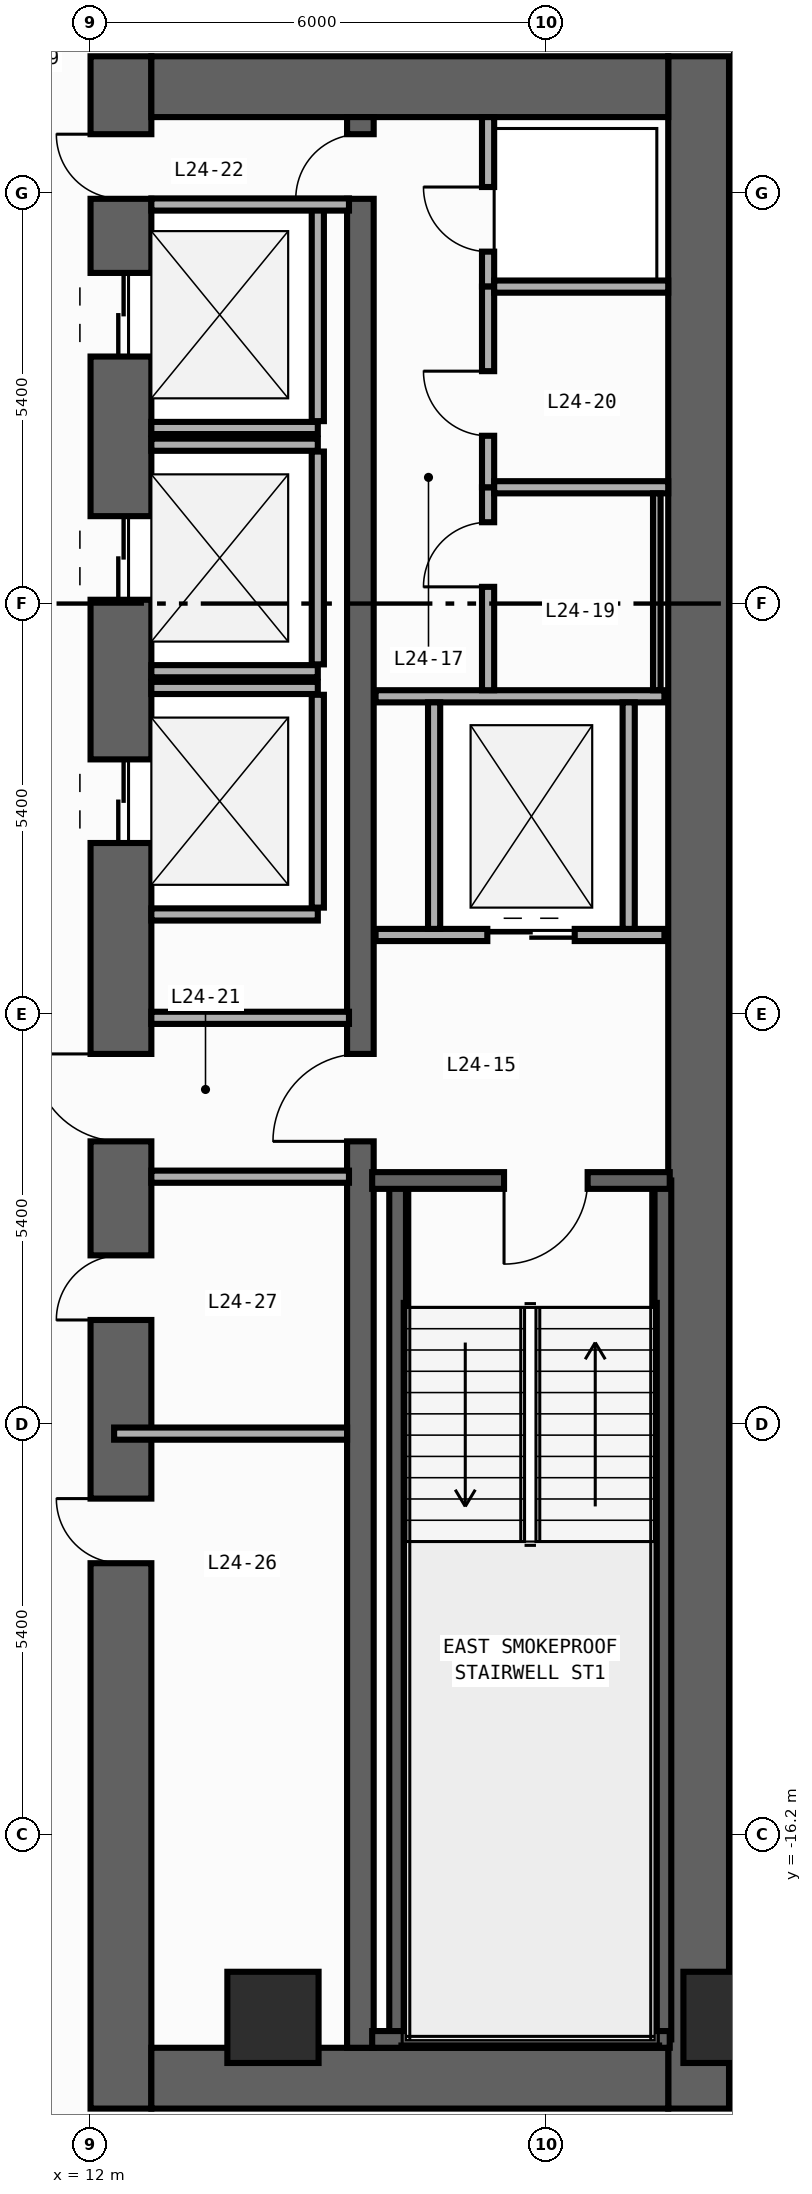
"""IFC4 building model, lengths in metres.
Left out: names, types, materials, properties, quantities, classifications, styles, units other than length and angle.
Written with IfcOpenShell. Run it as: python <this file> out.ifc"""

import sys

from ifc_helpers import new_model, si_unit, direction, frame, frame_2d, origin, origin_2d, place, context, subcontext, project, spatial, rectangle, extrude, element, fill, save


model = new_model("IFC4")
c1 = context("Model", 3, precision=1e-05, world=origin(), true_north=direction((0.0, 1.0)))
c2 = subcontext(c1, "Body", "Model", "MODEL_VIEW")
j1 = project(units=[si_unit("LENGTHUNIT", "METRE"), si_unit("PLANEANGLEUNIT", "RADIAN")], contexts=[c1])
p1 = place(None, origin())
s1 = spatial("IfcSite", under=j1, at=p1, CompositionType="ELEMENT")
p2 = place(p1, origin())
s2 = spatial("IfcBuilding", under=s1, at=p2, CompositionType="ELEMENT")
p3 = place(p2, frame((0.0, 0.0, 105.8)))
s3 = spatial("IfcBuildingStorey", under=s2, at=p3, CompositionType="ELEMENT", Elevation=105.8)
p4 = place(p3, frame((12.4, -19.8, 0.0), z_axis=(0.0, 0.0, 1.0), x_axis=(0.0, 1.0, 0.0)))
e1 = element("IfcWall", 1, at=p4, inside=s3, PredefinedType="SHEAR", context=c2, shape_type="SweptSolid", body=[
    extrude(rectangle(XDim=27.0, YDim=0.8, at=frame_2d((13.5, 0.0))), origin(), (0.0, 0.0, 1.0), 3.94),
])
p5 = place(p4, frame((23.05, 0.0, 0.0)))
e2 = element("IfcOpeningElement", 2, at=p5, cuts=e1, PredefinedType="OPENING", context=c2, shape_type="SweptSolid", body=[
    extrude(rectangle(XDim=1.1, YDim=2.2, at=frame_2d((0.55, 1.1))), frame((0.0, 0.41, 0.0), z_axis=(0.0, -1.0, 0.0), x_axis=(1.0, 0.0, 0.0)), (0.0, 0.0, 1.0), 0.82),
])
p6 = place(p4, frame((19.85, 0.0, 0.0)))
e3 = element("IfcOpeningElement", 3, at=p6, cuts=e1, PredefinedType="OPENING", context=c2, shape_type="SweptSolid", body=[
    extrude(rectangle(XDim=1.1, YDim=2.2, at=frame_2d((0.55, 1.1))), frame((0.0, 0.41, 0.0), z_axis=(0.0, -1.0, 0.0), x_axis=(1.0, 0.0, 0.0)), (0.0, 0.0, 1.0), 0.82),
])
p7 = place(p4, frame((16.65, 0.0, 0.0)))
e4 = element("IfcOpeningElement", 4, at=p7, cuts=e1, PredefinedType="OPENING", context=c2, shape_type="SweptSolid", body=[
    extrude(rectangle(XDim=1.1, YDim=2.2, at=frame_2d((0.55, 1.1))), frame((0.0, 0.41, 0.0), z_axis=(0.0, -1.0, 0.0), x_axis=(1.0, 0.0, 0.0)), (0.0, 0.0, 1.0), 0.82),
])
p8 = place(p4, frame((7.175, 0.0, 0.0)))
e5 = element("IfcOpeningElement", 5, at=p8, cuts=e1, PredefinedType="OPENING", context=c2, shape_type="SweptSolid", body=[
    extrude(rectangle(XDim=0.85, YDim=2.1, at=frame_2d((0.425, 1.05))), frame((0.0, 0.41, 0.0), z_axis=(0.0, -1.0, 0.0), x_axis=(1.0, 0.0, 0.0)), (0.0, 0.0, 1.0), 0.82),
])
p9 = place(p4, frame((10.375, 0.0, 0.0)))
e6 = element("IfcOpeningElement", 6, at=p9, cuts=e1, PredefinedType="OPENING", context=c2, shape_type="SweptSolid", body=[
    extrude(rectangle(XDim=0.85, YDim=2.1, at=frame_2d((0.425, 1.05))), frame((0.0, 0.41, 0.0), z_axis=(0.0, -1.0, 0.0), x_axis=(1.0, 0.0, 0.0)), (0.0, 0.0, 1.0), 0.82),
])
p10 = place(p4, frame((12.725, 0.0, 0.0)))
e7 = element("IfcOpeningElement", 7, at=p10, cuts=e1, PredefinedType="OPENING", context=c2, shape_type="SweptSolid", body=[
    extrude(rectangle(XDim=1.15, YDim=2.2, at=frame_2d((0.575, 1.1))), frame((0.0, 0.41, 0.0), z_axis=(0.0, -1.0, 0.0), x_axis=(1.0, 0.0, 0.0)), (0.0, 0.0, 1.0), 0.82),
])
p11 = place(p4, frame((25.125, 0.0, 0.0)))
e8 = element("IfcOpeningElement", 8, at=p11, cuts=e1, PredefinedType="OPENING", context=c2, shape_type="SweptSolid", body=[
    extrude(rectangle(XDim=0.85, YDim=2.1, at=frame_2d((0.425, 1.05))), frame((0.0, 0.41, 0.0), z_axis=(0.0, -1.0, 0.0), x_axis=(1.0, 0.0, 0.0)), (0.0, 0.0, 1.0), 0.82),
])
p12 = place(p3, frame((20.0, -19.8, 0.0), z_axis=(0.0, 0.0, 1.0), x_axis=(0.0, 1.0, 0.0)))
e9 = element("IfcWall", 9, at=p12, inside=s3, PredefinedType="SHEAR", context=c2, shape_type="SweptSolid", body=[
    extrude(rectangle(XDim=27.0, YDim=0.8, at=frame_2d((13.5, 0.0))), origin(), (0.0, 0.0, 1.0), 3.94),
])
for number, where, z_axis, x_axis in (
    (10, (12.8, -19.4, 0.0), (0.0, 0.0, 1.0), (1.0, 0.0, 0.0)),
    (11, (12.8, 6.8, 0.0), (0.0, 0.0, 1.0), (1.0, 0.0, 0.0)),
):
    element("IfcWall", number, at=place(p3, frame(where, z_axis=z_axis, x_axis=x_axis)), inside=s3, PredefinedType="SHEAR", context=c2, shape_type="SweptSolid", body=[
        extrude(rectangle(XDim=6.8, YDim=0.8, at=frame_2d((3.4, 0.0))), origin(), (0.0, 0.0, 1.0), 3.94),
    ])
p13 = place(p3, frame((15.55, -19.0, 0.0), z_axis=(0.0, 0.0, 1.0), x_axis=(0.0, 1.0, 0.0)))
e12 = element("IfcWall", 12, at=p13, inside=s3, PredefinedType="SHEAR", context=c2, shape_type="SweptSolid", body=[
    extrude(rectangle(XDim=25.4, YDim=0.35, at=frame_2d((12.7, 0.0))), origin(), (0.0, 0.0, 1.0), 3.94),
])
p14 = place(p13, frame((11.925, 0.0, 0.0)))
e13 = element("IfcOpeningElement", 13, at=p14, cuts=e12, PredefinedType="OPENING", context=c2, shape_type="SweptSolid", body=[
    extrude(rectangle(XDim=1.15, YDim=2.2, at=frame_2d((0.575, 1.1))), frame((0.0, 0.185, 0.0), z_axis=(0.0, -1.0, 0.0), x_axis=(1.0, 0.0, 0.0)), (0.0, 0.0, 1.0), 0.37),
])
p15 = place(p13, frame((24.325, 0.0, 0.0)))
e14 = element("IfcOpeningElement", 14, at=p15, cuts=e12, PredefinedType="OPENING", context=c2, shape_type="SweptSolid", body=[
    extrude(rectangle(XDim=0.85, YDim=2.1, at=frame_2d((0.425, 1.05))), frame((0.0, 0.185, 0.0), z_axis=(0.0, -1.0, 0.0), x_axis=(1.0, 0.0, 0.0)), (0.0, 0.0, 1.0), 0.37),
])
for number, where, z_axis, x_axis in (
    (15, (16.04, -18.89, 0.0), (0.0, 0.0, 1.0), (0.0, 1.0, 0.0)),
    (16, (19.53, -18.89, 0.0), (0.0, 0.0, 1.0), (0.0, 1.0, 0.0)),
):
    element("IfcWall", number, at=place(p3, frame(where, z_axis=z_axis, x_axis=x_axis)), inside=s3, PredefinedType="SHEAR", context=c2, shape_type="SweptSolid", body=[
        extrude(rectangle(XDim=11.3, YDim=0.22, at=frame_2d((5.65, 0.0))), origin(), (0.0, 0.0, 1.0), 3.94),
    ])
p16 = place(p3, frame((15.705, -18.89, 0.0), z_axis=(0.0, 0.0, 1.0), x_axis=(1.0, 0.0, 0.0)))
e17 = element("IfcWall", 17, at=p16, inside=s3, PredefinedType="SHEAR", context=c2, shape_type="SweptSolid", body=[
    extrude(rectangle(XDim=3.915, YDim=0.22, at=frame_2d((1.958, 0.0))), origin(), (0.0, 0.0, 1.0), 3.94),
])
p17 = place(p3, frame((19.62, -7.59, 0.0), z_axis=(0.0, 0.0, 1.0), x_axis=(-1.0, 0.0, 0.0)))
e18 = element("IfcWall", 18, at=p17, inside=s3, PredefinedType="SHEAR", context=c2, shape_type="SweptSolid", body=[
    extrude(rectangle(XDim=3.915, YDim=0.22, at=frame_2d((1.958, 0.0))), origin(), (0.0, 0.0, 1.0), 3.94),
])
p18 = place(p17, frame((1.08, 0.0, 0.0)))
e19 = element("IfcOpeningElement", 19, at=p18, cuts=e18, PredefinedType="OPENING", context=c2, shape_type="SweptSolid", body=[
    extrude(rectangle(XDim=1.1, YDim=2.2, at=frame_2d((0.55, 1.1))), frame((0.0, 0.12, 0.0), z_axis=(0.0, -1.0, 0.0), x_axis=(1.0, 0.0, 0.0)), (0.0, 0.0, 1.0), 0.24),
])
for number, where, z_axis, x_axis in (
    (20, (20.4, -18.6, 0.0), (0.0, 0.0, 1.0), (1.0, 0.0, 0.0)),
    (21, (14.4, -18.6, 0.0), (0.0, 0.0, 1.0), (1.0, 0.0, 0.0)),
):
    element("IfcColumn", number, at=place(p3, frame(where, z_axis=z_axis, x_axis=x_axis)), inside=s3, PredefinedType="COLUMN", context=c2, shape_type="SweptSolid", body=[
        extrude(rectangle(XDim=1.2, YDim=1.2, at=origin_2d()), origin(), (0.0, 0.0, 1.0), 4.2),
    ])
p19 = place(p3, frame((12.8, 2.31, 0.0), z_axis=(0.0, 0.0, 1.0), x_axis=(1.0, 0.0, 0.0)))
e22 = element("IfcWall", 22, at=p19, inside=s3, PredefinedType="STANDARD", context=c2, shape_type="SweptSolid", body=[
    extrude(rectangle(XDim=2.19, YDim=0.16, at=frame_2d((1.095, 0.0))), origin(), (0.0, 0.0, 1.0), 3.94),
])
p20 = place(p3, frame((14.99, 2.4, 0.0), z_axis=(0.0, 0.0, 1.0), x_axis=(0.0, 1.0, 0.0)))
e23 = element("IfcWall", 23, at=p20, inside=s3, PredefinedType="STANDARD", context=c2, shape_type="SweptSolid", body=[
    extrude(rectangle(XDim=2.8, YDim=0.16, at=frame_2d((1.4, 0.0))), origin(), (0.0, 0.0, 1.0), 3.94),
])
for number, where, z_axis, x_axis in (
    (24, (12.8, -0.89, 0.0), (0.0, 0.0, 1.0), (1.0, 0.0, 0.0)),
    (25, (12.8, 2.09, 0.0), (0.0, 0.0, 1.0), (1.0, 0.0, 0.0)),
):
    element("IfcWall", number, at=place(p3, frame(where, z_axis=z_axis, x_axis=x_axis)), inside=s3, PredefinedType="STANDARD", context=c2, shape_type="SweptSolid", body=[
        extrude(rectangle(XDim=2.19, YDim=0.16, at=frame_2d((1.095, 0.0))), origin(), (0.0, 0.0, 1.0), 3.94),
    ])
p21 = place(p3, frame((14.99, -0.8, 0.0), z_axis=(0.0, 0.0, 1.0), x_axis=(0.0, 1.0, 0.0)))
e26 = element("IfcWall", 26, at=p21, inside=s3, PredefinedType="STANDARD", context=c2, shape_type="SweptSolid", body=[
    extrude(rectangle(XDim=2.8, YDim=0.16, at=frame_2d((1.4, 0.0))), origin(), (0.0, 0.0, 1.0), 3.94),
])
for number, where, z_axis, x_axis in (
    (27, (12.8, -4.09, 0.0), (0.0, 0.0, 1.0), (1.0, 0.0, 0.0)),
    (28, (12.8, -1.11, 0.0), (0.0, 0.0, 1.0), (1.0, 0.0, 0.0)),
):
    element("IfcWall", number, at=place(p3, frame(where, z_axis=z_axis, x_axis=x_axis)), inside=s3, PredefinedType="STANDARD", context=c2, shape_type="SweptSolid", body=[
        extrude(rectangle(XDim=2.19, YDim=0.16, at=frame_2d((1.095, 0.0))), origin(), (0.0, 0.0, 1.0), 3.94),
    ])
p22 = place(p3, frame((14.99, -4.0, 0.0), z_axis=(0.0, 0.0, 1.0), x_axis=(0.0, 1.0, 0.0)))
e29 = element("IfcWall", 29, at=p22, inside=s3, PredefinedType="STANDARD", context=c2, shape_type="SweptSolid", body=[
    extrude(rectangle(XDim=2.8, YDim=0.16, at=frame_2d((1.4, 0.0))), origin(), (0.0, 0.0, 1.0), 3.94),
])
p23 = place(p3, frame((15.75, -4.36, 0.0), z_axis=(0.0, 0.0, 1.0), x_axis=(1.0, 0.0, 0.0)))
e30 = element("IfcWall", 30, at=p23, inside=s3, PredefinedType="STANDARD", context=c2, shape_type="SweptSolid", body=[
    extrude(rectangle(XDim=3.8, YDim=0.16, at=frame_2d((1.9, 0.0))), origin(), (0.0, 0.0, 1.0), 3.94),
])
p24 = place(p23, frame((1.47, 0.0, 0.0)))
e31 = element("IfcOpeningElement", 31, at=p24, cuts=e30, PredefinedType="OPENING", context=c2, shape_type="SweptSolid", body=[
    extrude(rectangle(XDim=1.15, YDim=2.2, at=frame_2d((0.575, 1.1))), frame((0.0, 0.09, 0.0), z_axis=(0.0, -1.0, 0.0), x_axis=(1.0, 0.0, 0.0)), (0.0, 0.0, 1.0), 0.18),
])
p25 = place(p3, frame((15.75, -1.22, 0.0), z_axis=(0.0, 0.0, 1.0), x_axis=(1.0, 0.0, 0.0)))
e32 = element("IfcWall", 32, at=p25, inside=s3, PredefinedType="STANDARD", context=c2, shape_type="SweptSolid", body=[
    extrude(rectangle(XDim=3.8, YDim=0.16, at=frame_2d((1.9, 0.0))), origin(), (0.0, 0.0, 1.0), 3.94),
])
for number, where, z_axis, x_axis in (
    (33, (16.52, -4.28, 0.0), (0.0, 0.0, 1.0), (0.0, 1.0, 0.0)),
    (34, (19.08, -4.28, 0.0), (0.0, 0.0, 1.0), (0.0, 1.0, 0.0)),
):
    element("IfcWall", number, at=place(p3, frame(where, z_axis=z_axis, x_axis=x_axis)), inside=s3, PredefinedType="STANDARD", context=c2, shape_type="SweptSolid", body=[
        extrude(rectangle(XDim=2.98, YDim=0.16, at=frame_2d((1.49, 0.0))), origin(), (0.0, 0.0, 1.0), 3.94),
    ])
for number, where, z_axis, x_axis in (
    (35, (12.8, -5.45, 0.0), (0.0, 0.0, 1.0), (1.0, 0.0, 0.0)),
    (36, (12.8, -7.54, 0.0), (0.0, 0.0, 1.0), (1.0, 0.0, 0.0)),
    (37, (12.8, 5.25, 0.0), (0.0, 0.0, 1.0), (1.0, 0.0, 0.0)),
):
    element("IfcWall", number, at=place(p3, frame(where, z_axis=z_axis, x_axis=x_axis)), inside=s3, PredefinedType="STANDARD", context=c2, shape_type="SweptSolid", body=[
        extrude(rectangle(XDim=2.6, YDim=0.16, at=frame_2d((1.3, 0.0))), origin(), (0.0, 0.0, 1.0), 3.94),
    ])
p26 = place(p3, frame((17.23, 4.17, 0.0), z_axis=(0.0, 0.0, 1.0), x_axis=(0.0, 1.0, 0.0)))
e38 = element("IfcWall", 38, at=p26, inside=s3, PredefinedType="PARTITIONING", context=c2, shape_type="SweptSolid", body=[
    extrude(rectangle(XDim=2.23, YDim=0.16, at=frame_2d((1.115, 0.0))), origin(), (0.0, 0.0, 1.0), 3.94),
])
p27 = place(p26, frame((0.46, 0.0, 0.0)))
e39 = element("IfcOpeningElement", 39, at=p27, cuts=e38, PredefinedType="OPENING", context=c2, shape_type="SweptSolid", body=[
    extrude(rectangle(XDim=0.85, YDim=2.1, at=frame_2d((0.425, 1.05))), frame((0.0, 0.09, 0.0), z_axis=(0.0, -1.0, 0.0), x_axis=(1.0, 0.0, 0.0)), (0.0, 0.0, 1.0), 0.18),
])
p28 = place(p3, frame((17.23, -1.14, 0.0), z_axis=(0.0, 0.0, 1.0), x_axis=(0.0, 1.0, 0.0)))
e40 = element("IfcWall", 40, at=p28, inside=s3, PredefinedType="PARTITIONING", context=c2, shape_type="SweptSolid", body=[
    extrude(rectangle(XDim=2.67, YDim=0.16, at=frame_2d((1.335, 0.0))), origin(), (0.0, 0.0, 1.0), 3.94),
])
p29 = place(p28, frame((1.36, 0.0, 0.0)))
e41 = element("IfcOpeningElement", 41, at=p29, cuts=e40, PredefinedType="OPENING", context=c2, shape_type="SweptSolid", body=[
    extrude(rectangle(XDim=0.85, YDim=2.1, at=frame_2d((0.425, 1.05))), frame((0.0, 0.09, 0.0), z_axis=(0.0, -1.0, 0.0), x_axis=(1.0, 0.0, 0.0)), (0.0, 0.0, 1.0), 0.18),
])
p30 = place(p3, frame((17.23, 1.53, 0.0), z_axis=(0.0, 0.0, 1.0), x_axis=(0.0, 1.0, 0.0)))
e42 = element("IfcWall", 42, at=p30, inside=s3, PredefinedType="PARTITIONING", context=c2, shape_type="SweptSolid", body=[
    extrude(rectangle(XDim=2.64, YDim=0.16, at=frame_2d((1.32, 0.0))), origin(), (0.0, 0.0, 1.0), 3.94),
])
p31 = place(p30, frame((0.677, 0.0, 0.0)))
e43 = element("IfcOpeningElement", 43, at=p31, cuts=e42, PredefinedType="OPENING", context=c2, shape_type="SweptSolid", body=[
    extrude(rectangle(XDim=0.85, YDim=2.1, at=frame_2d((0.425, 1.05))), frame((0.0, 0.09, 0.0), z_axis=(0.0, -1.0, 0.0), x_axis=(1.0, 0.0, 0.0)), (0.0, 0.0, 1.0), 0.18),
])
for number, where, z_axis, x_axis in (
    (44, (17.31, 4.17, 0.0), (0.0, 0.0, 1.0), (1.0, 0.0, 0.0)),
    (45, (17.31, 1.53, 0.0), (0.0, 0.0, 1.0), (1.0, 0.0, 0.0)),
):
    element("IfcWall", number, at=place(p3, frame(where, z_axis=z_axis, x_axis=x_axis)), inside=s3, PredefinedType="PARTITIONING", context=c2, shape_type="SweptSolid", body=[
        extrude(rectangle(XDim=2.29, YDim=0.16, at=frame_2d((1.145, 0.0))), origin(), (0.0, 0.0, 1.0), 3.94),
    ])
p32 = place(p3, frame((12.31, -10.92, 0.0), z_axis=(0.0, 0.0, 1.0), x_axis=(1.0, 0.0, 0.0)))
e46 = element("IfcWall", 46, at=p32, inside=s3, PredefinedType="PARTITIONING", context=c2, shape_type="SweptSolid", body=[
    extrude(rectangle(XDim=3.065, YDim=0.16, at=frame_2d((1.532, 0.0))), origin(), (0.0, 0.0, 1.0), 3.24),
])
p33 = place(p3, frame((19.45, 1.45, 0.0), z_axis=(0.0, 0.0, 1.0), x_axis=(0.0, -1.0, 0.0)))
e47 = element("IfcWall", 47, at=p33, inside=s3, PredefinedType="PARTITIONING", context=c2, shape_type="SweptSolid", body=[
    extrude(rectangle(XDim=2.59, YDim=0.1, at=frame_2d((1.295, 0.0))), origin(), (0.0, 0.0, 1.0), 3.94),
])
p34 = place(p18, origin())
e48 = element("IfcDoor", 48, at=p34, inside=s3, OperationType="SINGLE_SWING_RIGHT", PredefinedType="DOOR", context=c2, shape_type="SweptSolid", body=[
    extrude(rectangle(XDim=1.1, YDim=2.2, at=frame_2d((0.55, 1.1))), frame((0.0, 0.025, 0.0), z_axis=(0.0, -1.0, 0.0), x_axis=(1.0, 0.0, 0.0)), (0.0, 0.0, 1.0), 0.05),
])
fill(e19, e48)
p35 = place(p5, origin())
e49 = element("IfcDoor", 49, at=p35, inside=s3, OperationType="DOUBLE_DOOR_SLIDING", PredefinedType="DOOR", context=c2, shape_type="SweptSolid", body=[
    extrude(rectangle(XDim=1.1, YDim=2.2, at=frame_2d((0.55, 1.1))), frame((0.0, 0.025, 0.0), z_axis=(0.0, -1.0, 0.0), x_axis=(1.0, 0.0, 0.0)), (0.0, 0.0, 1.0), 0.05),
])
fill(e2, e49)
p36 = place(p6, origin())
e50 = element("IfcDoor", 50, at=p36, inside=s3, OperationType="DOUBLE_DOOR_SLIDING", PredefinedType="DOOR", context=c2, shape_type="SweptSolid", body=[
    extrude(rectangle(XDim=1.1, YDim=2.2, at=frame_2d((0.55, 1.1))), frame((0.0, 0.025, 0.0), z_axis=(0.0, -1.0, 0.0), x_axis=(1.0, 0.0, 0.0)), (0.0, 0.0, 1.0), 0.05),
])
fill(e3, e50)
p37 = place(p7, origin())
e51 = element("IfcDoor", 51, at=p37, inside=s3, OperationType="DOUBLE_DOOR_SLIDING", PredefinedType="DOOR", context=c2, shape_type="SweptSolid", body=[
    extrude(rectangle(XDim=1.1, YDim=2.2, at=frame_2d((0.55, 1.1))), frame((0.0, 0.025, 0.0), z_axis=(0.0, -1.0, 0.0), x_axis=(1.0, 0.0, 0.0)), (0.0, 0.0, 1.0), 0.05),
])
fill(e4, e51)
p38 = place(p8, origin())
e52 = element("IfcDoor", 52, at=p38, inside=s3, OperationType="SINGLE_SWING_RIGHT", PredefinedType="DOOR", context=c2, shape_type="SweptSolid", body=[
    extrude(rectangle(XDim=0.85, YDim=2.1, at=frame_2d((0.425, 1.05))), frame((0.0, 0.025, 0.0), z_axis=(0.0, -1.0, 0.0), x_axis=(1.0, 0.0, 0.0)), (0.0, 0.0, 1.0), 0.05),
])
fill(e5, e52)
p39 = place(p9, origin())
e53 = element("IfcDoor", 53, at=p39, inside=s3, OperationType="SINGLE_SWING_LEFT", PredefinedType="DOOR", context=c2, shape_type="SweptSolid", body=[
    extrude(rectangle(XDim=0.85, YDim=2.1, at=frame_2d((0.425, 1.05))), frame((0.0, 0.025, 0.0), z_axis=(0.0, -1.0, 0.0), x_axis=(1.0, 0.0, 0.0)), (0.0, 0.0, 1.0), 0.05),
])
fill(e6, e53)
p40 = place(p10, origin())
e54 = element("IfcDoor", 54, at=p40, inside=s3, OperationType="SINGLE_SWING_RIGHT", PredefinedType="DOOR", context=c2, shape_type="SweptSolid", body=[
    extrude(rectangle(XDim=1.15, YDim=2.2, at=frame_2d((0.575, 1.1))), frame((0.0, 0.025, 0.0), z_axis=(0.0, -1.0, 0.0), x_axis=(1.0, 0.0, 0.0)), (0.0, 0.0, 1.0), 0.05),
])
fill(e7, e54)
p41 = place(p14, origin())
e55 = element("IfcDoor", 55, at=p41, inside=s3, OperationType="SINGLE_SWING_LEFT", PredefinedType="DOOR", context=c2, shape_type="SweptSolid", body=[
    extrude(rectangle(XDim=1.15, YDim=2.2, at=frame_2d((0.575, 1.1))), frame((0.0, 0.025, 0.0), z_axis=(0.0, -1.0, 0.0), x_axis=(1.0, 0.0, 0.0)), (0.0, 0.0, 1.0), 0.05),
])
fill(e13, e55)
p42 = place(p11, origin())
e56 = element("IfcDoor", 56, at=p42, inside=s3, OperationType="SINGLE_SWING_RIGHT", PredefinedType="DOOR", context=c2, shape_type="SweptSolid", body=[
    extrude(rectangle(XDim=0.85, YDim=2.1, at=frame_2d((0.425, 1.05))), frame((0.0, 0.025, 0.0), z_axis=(0.0, -1.0, 0.0), x_axis=(1.0, 0.0, 0.0)), (0.0, 0.0, 1.0), 0.05),
])
fill(e8, e56)
p43 = place(p15, origin())
e57 = element("IfcDoor", 57, at=p43, inside=s3, OperationType="SINGLE_SWING_LEFT", PredefinedType="DOOR", context=c2, shape_type="SweptSolid", body=[
    extrude(rectangle(XDim=0.85, YDim=2.1, at=frame_2d((0.425, 1.05))), frame((0.0, 0.025, 0.0), z_axis=(0.0, -1.0, 0.0), x_axis=(1.0, 0.0, 0.0)), (0.0, 0.0, 1.0), 0.05),
])
fill(e14, e57)
p44 = place(p24, origin())
e58 = element("IfcDoor", 58, at=p44, inside=s3, OperationType="DOUBLE_DOOR_SLIDING", PredefinedType="DOOR", context=c2, shape_type="SweptSolid", body=[
    extrude(rectangle(XDim=1.15, YDim=2.2, at=frame_2d((0.575, 1.1))), frame((0.0, 0.025, 0.0), z_axis=(0.0, -1.0, 0.0), x_axis=(1.0, 0.0, 0.0)), (0.0, 0.0, 1.0), 0.05),
])
fill(e31, e58)
p45 = place(p27, origin())
e59 = element("IfcDoor", 59, at=p45, inside=s3, OperationType="SINGLE_SWING_RIGHT", PredefinedType="DOOR", context=c2, shape_type="SweptSolid", body=[
    extrude(rectangle(XDim=0.85, YDim=2.1, at=frame_2d((0.425, 1.05))), frame((0.0, 0.025, 0.0), z_axis=(0.0, -1.0, 0.0), x_axis=(1.0, 0.0, 0.0)), (0.0, 0.0, 1.0), 0.05),
])
fill(e39, e59)
p46 = place(p29, origin())
e60 = element("IfcDoor", 60, at=p46, inside=s3, OperationType="SINGLE_SWING_LEFT", PredefinedType="DOOR", context=c2, shape_type="SweptSolid", body=[
    extrude(rectangle(XDim=0.85, YDim=2.1, at=frame_2d((0.425, 1.05))), frame((0.0, 0.025, 0.0), z_axis=(0.0, -1.0, 0.0), x_axis=(1.0, 0.0, 0.0)), (0.0, 0.0, 1.0), 0.05),
])
fill(e41, e60)
p47 = place(p31, origin())
e61 = element("IfcDoor", 61, at=p47, inside=s3, OperationType="SINGLE_SWING_RIGHT", PredefinedType="DOOR", context=c2, shape_type="SweptSolid", body=[
    extrude(rectangle(XDim=0.85, YDim=2.1, at=frame_2d((0.425, 1.05))), frame((0.0, 0.025, 0.0), z_axis=(0.0, -1.0, 0.0), x_axis=(1.0, 0.0, 0.0)), (0.0, 0.0, 1.0), 0.05),
])
fill(e43, e61)
save(model, sys.argv[1])
